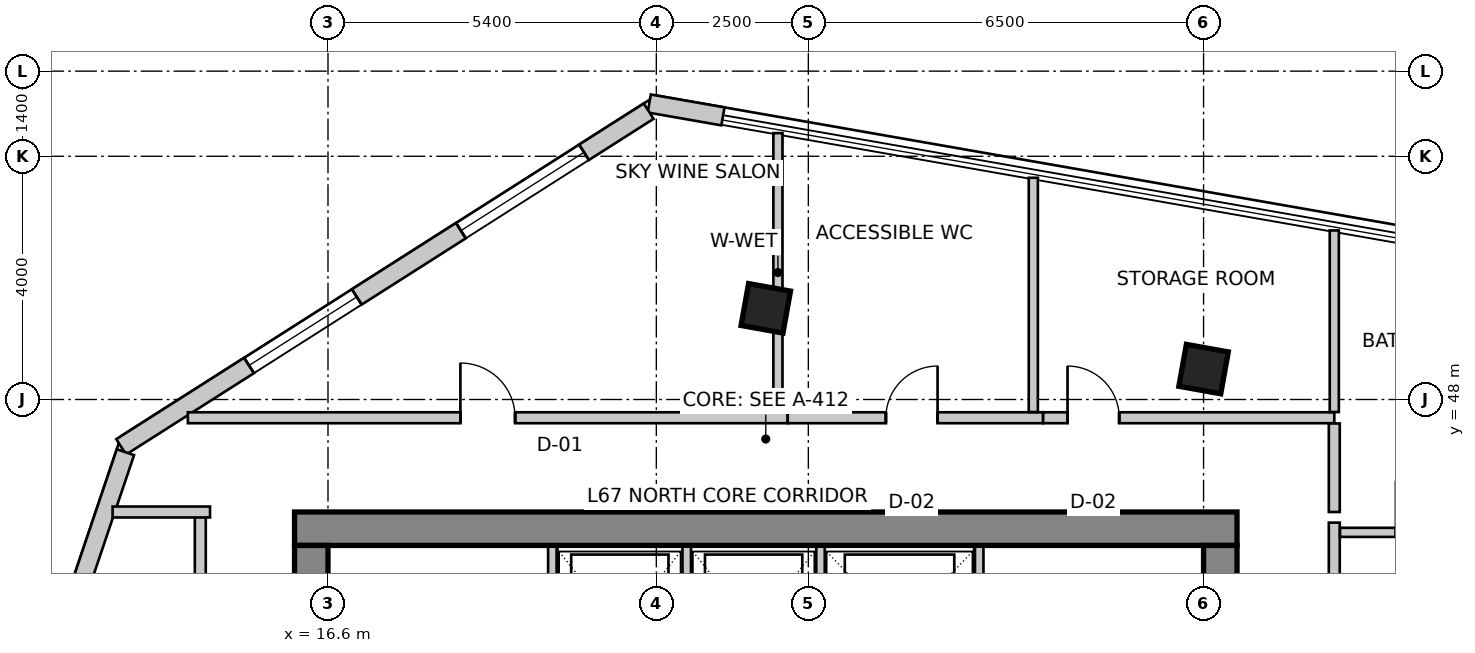
"""IFC4 building model, lengths in metres.
Left out: names, types, materials, properties, quantities, classifications, styles, units other than length and angle.
Written with IfcOpenShell. Run it as: python <this file> out.ifc"""

import sys

from ifc_helpers import new_model, si_unit, direction, frame, frame_2d, origin, origin_2d, place, context, subcontext, project, spatial, rectangle, extrude, source, transform, mapped, element, fill, save


model = new_model("IFC4")
c1 = context("Model", 3, precision=1e-05, world=origin(), true_north=direction((0.0, 1.0)))
c2 = subcontext(c1, "Body", "Model", "MODEL_VIEW")
j1 = project(units=[si_unit("LENGTHUNIT", "METRE"), si_unit("PLANEANGLEUNIT", "RADIAN")], contexts=[c1])
p1 = place(None, origin())
s1 = spatial("IfcSite", under=j1, at=p1, CompositionType="ELEMENT")
p2 = place(p1, origin())
s2 = spatial("IfcBuilding", under=s1, at=p2, CompositionType="ELEMENT")
p3 = place(p2, frame((0.0, 0.0, 263.7)))
s3 = spatial("IfcBuildingStorey", under=s2, at=p3, CompositionType="ELEMENT", Elevation=263.7)
p4 = place(p3, frame((16.05, 45.875, 0.0), z_axis=(0.0, 0.0, 1.0), x_axis=(1.0, 0.0, 0.0)))
e1 = element("IfcWall", 1, at=p4, inside=s3, PredefinedType="SHEAR", context=c2, shape_type="SweptSolid", body=[
    extrude(rectangle(XDim=15.5, YDim=0.55, at=frame_2d((7.75, 0.0))), origin(), (0.0, 0.0, 1.0), 3.6),
])
p5 = place(p3, frame((16.325, 34.2, 0.0), z_axis=(0.0, 0.0, 1.0), x_axis=(0.0, 1.0, 0.0)))
e2 = element("IfcWall", 2, at=p5, inside=s3, PredefinedType="SHEAR", context=c2, shape_type="SweptSolid", body=[
    extrude(rectangle(XDim=11.4, YDim=0.55, at=frame_2d((5.7, 0.0))), origin(), (0.0, 0.0, 1.0), 3.6),
])
m1 = source(origin(), c2, "Body", "SweptSolid", [
    extrude(rectangle(XDim=1.1, YDim=2.15, at=frame_2d((0.55, 1.075))), frame((0.0, 0.285, 0.0), z_axis=(0.0, -1.0, 0.0), x_axis=(1.0, 0.0, 0.0)), (0.0, 0.0, 1.0), 0.57),
])
p6 = place(p5, frame((7.15, 0.0, 0.0)))
e3 = element("IfcOpeningElement", 3, at=p6, cuts=e2, PredefinedType="OPENING", context=c2, shape_type="MappedRepresentation", body=[
    mapped(m1, transform((0.0, 0.0, 0.0), scale=1.0)),
])
p7 = place(p3, frame((31.275, 34.2, 0.0), z_axis=(0.0, 0.0, 1.0), x_axis=(0.0, 1.0, 0.0)))
e4 = element("IfcWall", 4, at=p7, inside=s3, PredefinedType="SHEAR", context=c2, shape_type="SweptSolid", body=[
    extrude(rectangle(XDim=11.4, YDim=0.55, at=frame_2d((5.7, 0.0))), origin(), (0.0, 0.0, 1.0), 3.6),
])
p8 = place(p7, frame((7.35, 0.0, 0.0)))
e5 = element("IfcOpeningElement", 5, at=p8, cuts=e4, PredefinedType="OPENING", context=c2, shape_type="MappedRepresentation", body=[
    mapped(m1, transform((0.0, 0.0, 0.0), scale=1.0)),
])
m2 = source(origin(), c2, "Body", "SweptSolid", [
    extrude(rectangle(XDim=0.7, YDim=0.7, at=origin_2d()), origin(), (0.0, 0.0, 1.0), 3.6),
])
for number, where, z_axis, x_axis in (
    (6, (23.8, 49.5, 0.0), (0.0, 0.0, 1.0), (0.984, -0.177, 0.0)),
    (7, (31.0, 48.5, 0.0), (0.0, 0.0, 1.0), (0.984, -0.177, 0.0)),
):
    element("IfcColumn", number, at=place(p3, frame(where, z_axis=z_axis, x_axis=x_axis)), inside=s3, PredefinedType="COLUMN", context=c2, shape_type="MappedRepresentation", body=[
        mapped(m2, transform((0.0, 0.0, 0.0), scale=1.0)),
    ])
p9 = place(p3, frame((23.095, 52.656, 0.0), z_axis=(0.0, 0.0, 1.0), x_axis=(-0.985008549623, 0.172505527937, 0.0)))
e8 = element("IfcWall", 8, at=p9, inside=s3, PredefinedType="SOLIDWALL", context=c2, shape_type="SweptSolid", body=[
    extrude(rectangle(XDim=1.23, YDim=0.3, at=frame_2d((0.615, 0.0))), origin(), (0.0, 0.0, 1.0), 3.35),
])
p10 = place(p3, frame((21.874, 52.742, 0.0), z_axis=(0.0, 0.0, 1.0), x_axis=(-0.84365659959, -0.536883173482, 0.0)))
e9 = element("IfcWall", 9, at=p10, inside=s3, PredefinedType="SOLIDWALL", context=c2, shape_type="SweptSolid", body=[
    extrude(rectangle(XDim=10.283, YDim=0.3, at=frame_2d((5.142, 0.0))), origin(), (0.0, 0.0, 1.0), 3.35),
])
m3 = source(origin(), c2, "Body", "SweptSolid", [
    extrude(rectangle(XDim=2.4, YDim=2.2, at=frame_2d((1.2, 1.1))), frame((0.0, 0.16, 0.0), z_axis=(0.0, -1.0, 0.0), x_axis=(1.0, 0.0, 0.0)), (0.0, 0.0, 1.0), 0.32),
])
p11 = place(p10, frame((1.26, 0.0, 0.85)))
e10 = element("IfcOpeningElement", 10, at=p11, cuts=e9, PredefinedType="OPENING", context=c2, shape_type="MappedRepresentation", body=[
    mapped(m3, transform((0.0, 0.0, 0.0), scale=1.0)),
])
m4 = source(origin(), c2, "Body", "SweptSolid", [
    extrude(rectangle(XDim=2.1, YDim=2.0, at=frame_2d((1.05, 1.0))), frame((0.0, 0.16, 0.0), z_axis=(0.0, -1.0, 0.0), x_axis=(1.0, 0.0, 0.0)), (0.0, 0.0, 1.0), 0.32),
])
p12 = place(p10, frame((5.69, 0.0, 0.85)))
e11 = element("IfcOpeningElement", 11, at=p12, cuts=e9, PredefinedType="OPENING", context=c2, shape_type="MappedRepresentation", body=[
    mapped(m4, transform((0.0, 0.0, 0.0), scale=1.0)),
])
p13 = place(p3, frame((13.269, 47.134, 0.0), z_axis=(0.0, 0.0, 1.0), x_axis=(-0.3199211297, -0.947444178182, 0.0)))
e12 = element("IfcWall", 12, at=p13, inside=s3, PredefinedType="SOLIDWALL", context=c2, shape_type="SweptSolid", body=[
    extrude(rectangle(XDim=16.132, YDim=0.3, at=frame_2d((8.066, 0.0))), origin(), (0.0, 0.0, 1.0), 3.35),
])
p14 = place(p13, frame((2.585, 0.0, 0.85)))
e13 = element("IfcOpeningElement", 13, at=p14, cuts=e12, PredefinedType="OPENING", context=c2, shape_type="MappedRepresentation", body=[
    mapped(m4, transform((0.0, 0.0, 0.0), scale=1.0)),
])
p15 = place(p13, frame((7.267, 0.0, 0.85)))
e14 = element("IfcOpeningElement", 14, at=p15, cuts=e12, PredefinedType="OPENING", context=c2, shape_type="MappedRepresentation", body=[
    mapped(m3, transform((0.0, 0.0, 0.0), scale=1.0)),
])
p16 = place(p13, frame((12.249, 0.0, 0.85)))
e15 = element("IfcOpeningElement", 15, at=p16, cuts=e12, PredefinedType="OPENING", context=c2, shape_type="MappedRepresentation", body=[
    mapped(m4, transform((0.0, 0.0, 0.0), scale=1.0)),
])
for number, where, z_axis, x_axis in (
    (16, (20.29, 43.28, 0.0), (0.0, 0.0, 1.0), (0.0, 1.0, 0.0)),
    (17, (27.31, 43.28, 0.0), (0.0, 0.0, 1.0), (0.0, 1.0, 0.0)),
):
    element("IfcWall", number, at=place(p3, frame(where, z_axis=z_axis, x_axis=x_axis)), inside=s3, PredefinedType="SOLIDWALL", context=c2, shape_type="SweptSolid", body=[
        extrude(rectangle(XDim=2.3, YDim=0.14, at=frame_2d((1.15, 0.0))), origin(), (0.0, 0.0, 1.0), 3.35),
    ])
for number, where, z_axis, x_axis in (
    (18, (22.5, 43.02, 0.0), (0.0, 0.0, 1.0), (0.0, 1.0, 0.0)),
    (19, (24.7, 43.02, 0.0), (0.0, 0.0, 1.0), (0.0, 1.0, 0.0)),
):
    element("IfcWall", number, at=place(p3, frame(where, z_axis=z_axis, x_axis=x_axis)), inside=s3, PredefinedType="SOLIDWALL", context=c2, shape_type="SweptSolid", body=[
        extrude(rectangle(XDim=2.56, YDim=0.14, at=frame_2d((1.28, 0.0))), origin(), (0.0, 0.0, 1.0), 3.35),
    ])
p17 = place(p3, frame((14.5, 33.744, 0.0), z_axis=(0.0, 0.0, 1.0), x_axis=(0.0, 1.0, 0.0)))
e20 = element("IfcWall", 20, at=p17, inside=s3, PredefinedType="PARTITIONING", context=c2, shape_type="SweptSolid", body=[
    extrude(rectangle(XDim=12.406, YDim=0.18, at=frame_2d((6.203, 0.0))), origin(), (0.0, 0.0, 1.0), 3.35),
])
m5 = source(origin(), c2, "Body", "SweptSolid", [
    extrude(rectangle(XDim=0.9, YDim=2.15, at=frame_2d((0.45, 1.075))), frame((0.0, 0.1, 0.0), z_axis=(0.0, -1.0, 0.0), x_axis=(1.0, 0.0, 0.0)), (0.0, 0.0, 1.0), 0.2),
])
p18 = place(p17, frame((4.37, 0.0, 0.0)))
e21 = element("IfcOpeningElement", 21, at=p18, cuts=e20, PredefinedType="OPENING", context=c2, shape_type="MappedRepresentation", body=[
    mapped(m5, transform((0.0, 0.0, 0.0), scale=1.0)),
])
p19 = place(p3, frame((14.66, 46.15, 0.0), z_axis=(0.0, 0.0, 1.0), x_axis=(-1.0, 0.0, 0.0)))
e22 = element("IfcWall", 22, at=p19, inside=s3, PredefinedType="PARTITIONING", context=c2, shape_type="SweptSolid", body=[
    extrude(rectangle(XDim=1.602, YDim=0.18, at=frame_2d((0.801, 0.0))), origin(), (0.0, 0.0, 1.0), 3.35),
])
p20 = place(p3, frame((14.295, 47.7, 0.0), z_axis=(0.0, 0.0, 1.0), x_axis=(1.0, 0.0, 0.0)))
e23 = element("IfcWall", 23, at=p20, inside=s3, PredefinedType="PARTITIONING", context=c2, shape_type="SweptSolid", body=[
    extrude(rectangle(XDim=9.865, YDim=0.18, at=frame_2d((4.932, 0.0))), origin(), (0.0, 0.0, 1.0), 3.019),
])
p21 = place(p20, frame((4.482, 0.0, 0.0)))
e24 = element("IfcOpeningElement", 24, at=p21, cuts=e23, PredefinedType="OPENING", context=c2, shape_type="MappedRepresentation", body=[
    mapped(m5, transform((0.0, 0.0, 0.0), scale=1.0)),
])
p22 = place(p3, frame((24.162, 47.7, 0.0), z_axis=(0.0, 0.0, 1.0), x_axis=(1.0, 0.0, 0.0)))
e25 = element("IfcWall", 25, at=p22, inside=s3, PredefinedType="PARTITIONING", context=c2, shape_type="SweptSolid", body=[
    extrude(rectangle(XDim=4.198, YDim=0.18, at=frame_2d((2.099, 0.0))), origin(), (0.0, 0.0, 1.0), 3.35),
])
m6 = source(origin(), c2, "Body", "SweptSolid", [
    extrude(rectangle(XDim=0.85, YDim=2.15, at=frame_2d((0.425, 1.075))), frame((0.0, 0.1, 0.0), z_axis=(0.0, -1.0, 0.0), x_axis=(1.0, 0.0, 0.0)), (0.0, 0.0, 1.0), 0.2),
])
p23 = place(p22, frame((1.613, 0.0, 0.0)))
e26 = element("IfcOpeningElement", 26, at=p23, cuts=e25, PredefinedType="OPENING", context=c2, shape_type="MappedRepresentation", body=[
    mapped(m6, transform((0.0, 0.0, 0.0), scale=1.0)),
])
p24 = place(p3, frame((28.362, 47.7, 0.0), z_axis=(0.0, 0.0, 1.0), x_axis=(1.0, 0.0, 0.0)))
e27 = element("IfcWall", 27, at=p24, inside=s3, PredefinedType="PARTITIONING", context=c2, shape_type="SweptSolid", body=[
    extrude(rectangle(XDim=4.788, YDim=0.18, at=frame_2d((2.394, 0.0))), origin(), (0.0, 0.0, 1.0), 2.879),
])
p25 = place(p24, frame((0.401, 0.0, 0.0)))
e28 = element("IfcOpeningElement", 28, at=p25, cuts=e27, PredefinedType="OPENING", context=c2, shape_type="MappedRepresentation", body=[
    mapped(m6, transform((0.0, 0.0, 0.0), scale=1.0)),
])
p26 = place(p3, frame((33.15, 47.606, 0.0), z_axis=(0.0, 0.0, 1.0), x_axis=(0.0, -1.0, 0.0)))
e29 = element("IfcWall", 29, at=p26, inside=s3, PredefinedType="PARTITIONING", context=c2, shape_type="SweptSolid", body=[
    extrude(rectangle(XDim=1.456, YDim=0.18, at=frame_2d((0.728, 0.0))), origin(), (0.0, 0.0, 1.0), 3.35),
])
p27 = place(p3, frame((33.15, 45.975, 0.0), z_axis=(0.0, 0.0, 1.0), x_axis=(0.0, -1.0, 0.0)))
e30 = element("IfcWall", 30, at=p27, inside=s3, PredefinedType="PARTITIONING", context=c2, shape_type="SweptSolid", body=[
    extrude(rectangle(XDim=5.285, YDim=0.18, at=frame_2d((2.643, 0.0))), origin(), (0.0, 0.0, 1.0), 2.879),
])
p28 = place(p3, frame((24.0, 52.381, 0.0), z_axis=(0.0, 0.0, 1.0), x_axis=(0.0, -1.0, 0.0)))
e31 = element("IfcWall", 31, at=p28, inside=s3, PredefinedType="PARTITIONING", context=c2, shape_type="SweptSolid", body=[
    extrude(rectangle(XDim=4.587, YDim=0.15, at=frame_2d((2.293, 0.0))), origin(), (0.0, 0.0, 1.0), 2.642),
])
p29 = place(p3, frame((28.2, 51.646, 0.0), z_axis=(0.0, 0.0, 1.0), x_axis=(0.0, -1.0, 0.0)))
e32 = element("IfcWall", 32, at=p29, inside=s3, PredefinedType="PARTITIONING", context=c2, shape_type="SweptSolid", body=[
    extrude(rectangle(XDim=3.852, YDim=0.15, at=frame_2d((1.926, 0.0))), origin(), (0.0, 0.0, 1.0), 2.642),
])
p30 = place(p3, frame((33.15, 50.78, 0.0), z_axis=(0.0, 0.0, 1.0), x_axis=(0.0, -1.0, 0.0)))
e33 = element("IfcWall", 33, at=p30, inside=s3, PredefinedType="PARTITIONING", context=c2, shape_type="SweptSolid", body=[
    extrude(rectangle(XDim=2.986, YDim=0.15, at=frame_2d((1.493, 0.0))), origin(), (0.0, 0.0, 1.0), 2.642),
])
p31 = place(p3, frame((33.244, 45.815, 0.0), z_axis=(0.0, 0.0, 1.0), x_axis=(1.0, 0.0, 0.0)))
e34 = element("IfcWall", 34, at=p31, inside=s3, PredefinedType="PARTITIONING", context=c2, shape_type="SweptSolid", body=[
    extrude(rectangle(XDim=2.816, YDim=0.15, at=frame_2d((1.408, 0.0))), origin(), (0.0, 0.0, 1.0), 2.879),
])
m7 = source(origin(), c2, "Body", "SweptSolid", [
    extrude(rectangle(XDim=0.85, YDim=2.15, at=frame_2d((0.425, 1.075))), frame((0.0, 0.085, 0.0), z_axis=(0.0, -1.0, 0.0), x_axis=(1.0, 0.0, 0.0)), (0.0, 0.0, 1.0), 0.17),
])
p32 = place(p31, frame((0.919, 0.0, 0.0)))
e35 = element("IfcOpeningElement", 35, at=p32, cuts=e34, PredefinedType="OPENING", context=c2, shape_type="MappedRepresentation", body=[
    mapped(m7, transform((0.0, 0.0, 0.0), scale=1.0)),
])
m8 = source(origin(), c2, "Body", "SweptSolid", [
    extrude(rectangle(XDim=2.4, YDim=2.2, at=frame_2d((1.2, 1.1))), frame((0.0, -0.015, 0.0), z_axis=(0.0, -1.0, 0.0), x_axis=(1.0, 0.0, 0.0)), (0.0, 0.0, 1.0), 0.06),
])
p33 = place(p11, origin())
e36 = element("IfcWindow", 36, at=p33, inside=s3, PartitioningType="SINGLE_PANEL", PredefinedType="WINDOW", context=c2, shape_type="MappedRepresentation", body=[
    mapped(m8, transform((0.0, 0.0, 0.0), scale=1.0)),
])
fill(e10, e36)
m9 = source(origin(), c2, "Body", "SweptSolid", [
    extrude(rectangle(XDim=2.1, YDim=2.0, at=frame_2d((1.05, 1.0))), frame((0.0, -0.015, 0.0), z_axis=(0.0, -1.0, 0.0), x_axis=(1.0, 0.0, 0.0)), (0.0, 0.0, 1.0), 0.06),
])
p34 = place(p12, origin())
e37 = element("IfcWindow", 37, at=p34, inside=s3, PartitioningType="SINGLE_PANEL", PredefinedType="WINDOW", context=c2, shape_type="MappedRepresentation", body=[
    mapped(m9, transform((0.0, 0.0, 0.0), scale=1.0)),
])
fill(e11, e37)
m10 = source(origin(), c2, "Body", "SweptSolid", [
    extrude(rectangle(XDim=0.9, YDim=2.15, at=frame_2d((0.45, 1.075))), frame((0.0, 0.025, 0.0), z_axis=(0.0, -1.0, 0.0), x_axis=(1.0, 0.0, 0.0)), (0.0, 0.0, 1.0), 0.05),
])
p35 = place(p21, origin())
e38 = element("IfcDoor", 38, at=p35, inside=s3, OperationType="SINGLE_SWING_LEFT", PredefinedType="DOOR", context=c2, shape_type="MappedRepresentation", body=[
    mapped(m10, transform((0.0, 0.0, 0.0), scale=1.0)),
])
fill(e24, e38)
m11 = source(origin(), c2, "Body", "SweptSolid", [
    extrude(rectangle(XDim=0.85, YDim=2.15, at=frame_2d((0.425, 1.075))), frame((0.0, 0.025, 0.0), z_axis=(0.0, -1.0, 0.0), x_axis=(1.0, 0.0, 0.0)), (0.0, 0.0, 1.0), 0.05),
])
p36 = place(p23, origin())
e39 = element("IfcDoor", 39, at=p36, inside=s3, OperationType="SINGLE_SWING_RIGHT", PredefinedType="DOOR", context=c2, shape_type="MappedRepresentation", body=[
    mapped(m11, transform((0.0, 0.0, 0.0), scale=1.0)),
])
fill(e26, e39)
p37 = place(p25, origin())
e40 = element("IfcDoor", 40, at=p37, inside=s3, OperationType="SINGLE_SWING_LEFT", PredefinedType="DOOR", context=c2, shape_type="MappedRepresentation", body=[
    mapped(m11, transform((0.0, 0.0, 0.0), scale=1.0)),
])
fill(e28, e40)
save(model, sys.argv[1])
